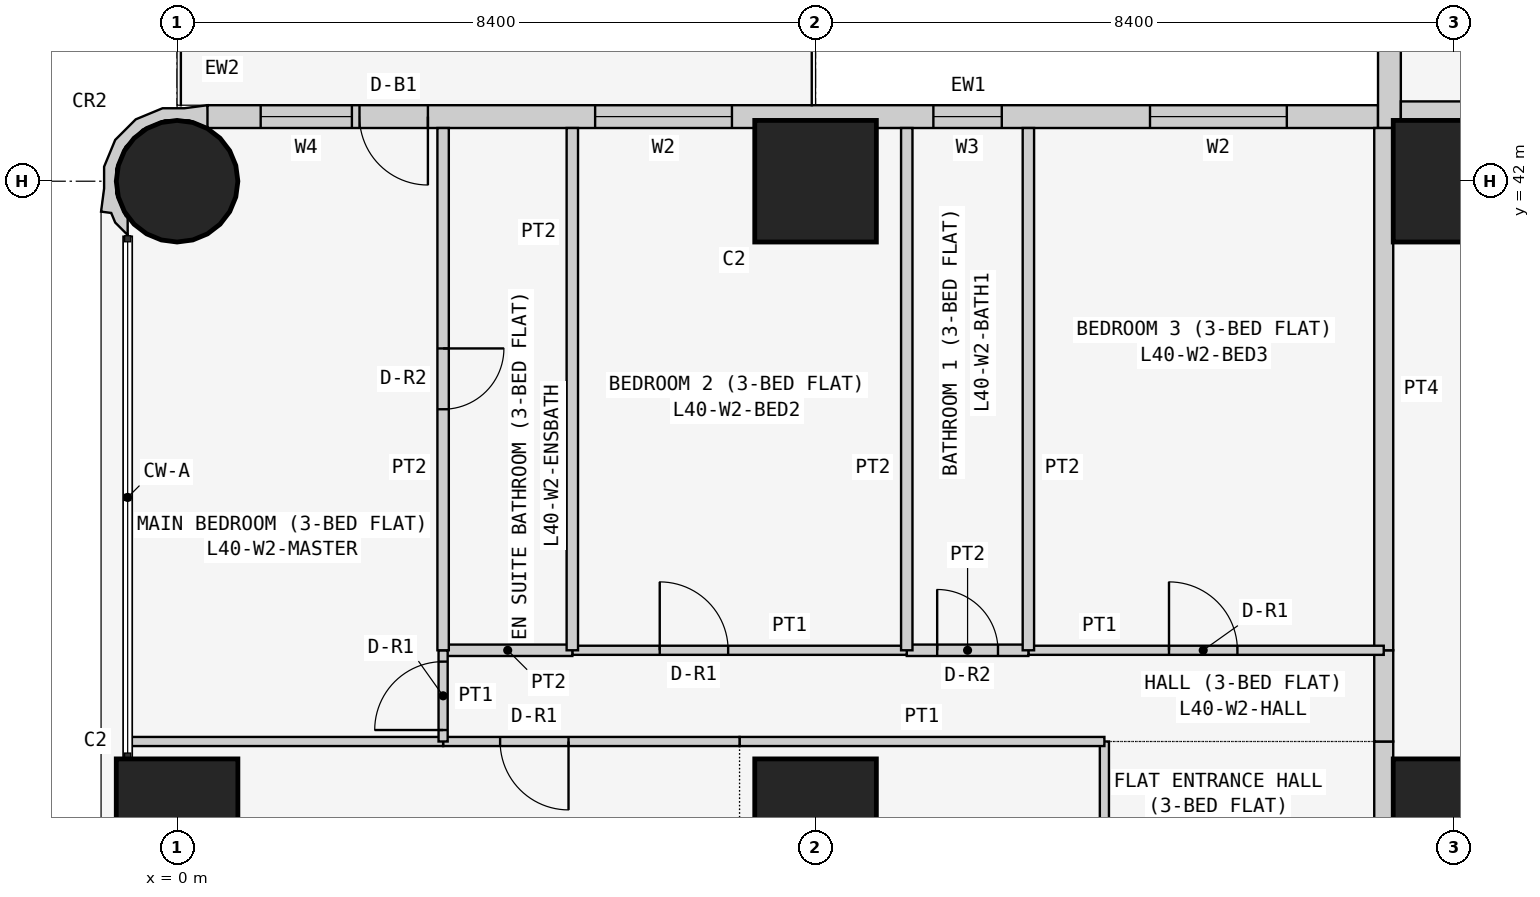
"""IFC4 building model, lengths in metres.
Left out: names, types, materials, properties, quantities, classifications, styles, units other than length and angle.
Written with IfcOpenShell. Run it as: python <this file> out.ifc"""

import sys

from ifc_helpers import new_model, si_unit, direction, frame, frame_2d, origin, origin_2d, place, context, subcontext, project, spatial, polyline, rectangle, circle, outline, extrude, element, fill, save


model = new_model("IFC4")
c1 = context("Model", 3, precision=1e-05, world=origin(), true_north=direction((0.0, 1.0)))
c2 = subcontext(c1, "Body", "Model", "MODEL_VIEW")
j1 = project(units=[si_unit("LENGTHUNIT", "METRE"), si_unit("PLANEANGLEUNIT", "RADIAN")], contexts=[c1])
p1 = place(None, origin())
s1 = spatial("IfcSite", under=j1, at=p1, CompositionType="ELEMENT")
p2 = place(p1, origin())
s2 = spatial("IfcBuilding", under=s1, at=p2, CompositionType="ELEMENT")
p3 = place(p2, frame((0.0, 0.0, 155.7)))
s3 = spatial("IfcBuildingStorey", under=s2, at=p3, CompositionType="ELEMENT", Elevation=155.7)
p4 = place(p3, frame((0.0, 33.6, 0.0), z_axis=(0.0, 0.0, 1.0), x_axis=(1.0, 0.0, 0.0)))
e1 = element("IfcColumn", 1, at=p4, inside=s3, PredefinedType="COLUMN", context=c2, shape_type="SweptSolid", body=[
    extrude(rectangle(XDim=1.6, YDim=1.6, at=origin_2d()), origin(), (0.0, 0.0, 1.0), 3.6),
])
p5 = place(p3, frame((0.0, 42.0, 0.0), z_axis=(0.0, 0.0, 1.0), x_axis=(1.0, 0.0, 0.0)))
e2 = element("IfcColumn", 2, at=p5, inside=s3, PredefinedType="COLUMN", context=c2, shape_type="SweptSolid", body=[
    extrude(circle(Radius=0.8, at=origin_2d()), origin(), (0.0, 0.0, 1.0), 3.6),
])
for number, where, z_axis, x_axis in (
    (3, (8.4, 33.6, 0.0), (0.0, 0.0, 1.0), (1.0, 0.0, 0.0)),
    (4, (8.4, 42.0, 0.0), (0.0, 0.0, 1.0), (1.0, 0.0, 0.0)),
    (5, (16.8, 33.6, 0.0), (0.0, 0.0, 1.0), (1.0, 0.0, 0.0)),
    (6, (16.8, 42.0, 0.0), (0.0, 0.0, 1.0), (1.0, 0.0, 0.0)),
):
    element("IfcColumn", number, at=place(p3, frame(where, z_axis=z_axis, x_axis=x_axis)), inside=s3, PredefinedType="COLUMN", context=c2, shape_type="SweptSolid", body=[
        extrude(rectangle(XDim=1.6, YDim=1.6, at=origin_2d()), origin(), (0.0, 0.0, 1.0), 3.6),
    ])
p6 = place(p3, frame((15.8, 42.85, 0.0), z_axis=(0.0, 0.0, 1.0), x_axis=(-1.0, 0.0, 0.0)))
e7 = element("IfcWall", 7, at=p6, inside=s3, PredefinedType="SOLIDWALL", context=c2, shape_type="SweptSolid", body=[
    extrude(rectangle(XDim=15.4, YDim=0.3, at=frame_2d((7.7, 0.0))), origin(), (0.0, 0.0, 1.0), 3.45),
])
p7 = place(p6, frame((1.2, 0.0, 0.9)))
e8 = element("IfcOpeningElement", 8, at=p7, cuts=e7, PredefinedType="OPENING", context=c2, shape_type="SweptSolid", body=[
    extrude(rectangle(XDim=1.8, YDim=1.5, at=frame_2d((0.9, 0.75))), frame((0.0, 0.16, 0.0), z_axis=(0.0, -1.0, 0.0), x_axis=(1.0, 0.0, 0.0)), (0.0, 0.0, 1.0), 0.32),
])
p8 = place(p6, frame((4.95, 0.0, 1.5)))
e9 = element("IfcOpeningElement", 9, at=p8, cuts=e7, PredefinedType="OPENING", context=c2, shape_type="SweptSolid", body=[
    extrude(rectangle(XDim=0.9, YDim=0.7, at=frame_2d((0.45, 0.35))), frame((0.0, 0.16, 0.0), z_axis=(0.0, -1.0, 0.0), x_axis=(1.0, 0.0, 0.0)), (0.0, 0.0, 1.0), 0.32),
])
p9 = place(p6, frame((8.5, 0.0, 0.9)))
e10 = element("IfcOpeningElement", 10, at=p9, cuts=e7, PredefinedType="OPENING", context=c2, shape_type="SweptSolid", body=[
    extrude(rectangle(XDim=1.8, YDim=1.5, at=frame_2d((0.9, 0.75))), frame((0.0, 0.16, 0.0), z_axis=(0.0, -1.0, 0.0), x_axis=(1.0, 0.0, 0.0)), (0.0, 0.0, 1.0), 0.32),
])
p10 = place(p6, frame((12.5, 0.0, 0.0)))
e11 = element("IfcOpeningElement", 11, at=p10, cuts=e7, PredefinedType="OPENING", context=c2, shape_type="SweptSolid", body=[
    extrude(rectangle(XDim=0.9, YDim=2.4, at=frame_2d((0.45, 1.2))), frame((0.0, 0.16, 0.0), z_axis=(0.0, -1.0, 0.0), x_axis=(1.0, 0.0, 0.0)), (0.0, 0.0, 1.0), 0.32),
])
p11 = place(p6, frame((13.5, 0.0, 0.9)))
e12 = element("IfcOpeningElement", 12, at=p11, cuts=e7, PredefinedType="OPENING", context=c2, shape_type="SweptSolid", body=[
    extrude(rectangle(XDim=1.2, YDim=1.5, at=frame_2d((0.6, 0.75))), frame((0.0, 0.16, 0.0), z_axis=(0.0, -1.0, 0.0), x_axis=(1.0, 0.0, 0.0)), (0.0, 0.0, 1.0), 0.32),
])
p12 = place(p3, frame((15.95, 50.0, 0.0), z_axis=(0.0, 0.0, 1.0), x_axis=(0.0, -1.0, 0.0)))
e13 = element("IfcWall", 13, at=p12, inside=s3, PredefinedType="SOLIDWALL", context=c2, shape_type="SweptSolid", body=[
    extrude(rectangle(XDim=7.3, YDim=0.3, at=frame_2d((3.65, 0.0))), origin(), (0.0, 0.0, 1.0), 3.45),
])
p13 = place(p12, frame((3.1, 0.0, 0.9)))
e14 = element("IfcOpeningElement", 14, at=p13, cuts=e13, PredefinedType="OPENING", context=c2, shape_type="SweptSolid", body=[
    extrude(rectangle(XDim=2.4, YDim=1.5, at=frame_2d((1.2, 0.75))), frame((0.0, 0.16, 0.0), z_axis=(0.0, -1.0, 0.0), x_axis=(1.0, 0.0, 0.0)), (0.0, 0.0, 1.0), 0.32),
])
p14 = place(p12, frame((0.75, 0.0, 0.9)))
e15 = element("IfcOpeningElement", 15, at=p14, cuts=e13, PredefinedType="OPENING", context=c2, shape_type="SweptSolid", body=[
    extrude(rectangle(XDim=1.2, YDim=1.5, at=frame_2d((0.6, 0.75))), frame((0.0, 0.16, 0.0), z_axis=(0.0, -1.0, 0.0), x_axis=(1.0, 0.0, 0.0)), (0.0, 0.0, 1.0), 0.32),
])
p15 = place(p3, frame((0.327, 42.817, 0.0), z_axis=(0.0, 0.0, 1.0), x_axis=(-0.93923434088, 0.343276641956, 0.0)))
e16 = element("IfcWall", 16, at=p15, inside=s3, PredefinedType="SOLIDWALL", context=c2, shape_type="SweptSolid", body=[
    extrude(outline(polyline([(-0.006, -0.197), (0.266, -0.055), (0.535, 0.044), (0.816, 0.302), (0.977, 0.648), (0.994, 1.03), (0.895, 1.299), (0.828, 1.598), (0.697, 1.569), (0.604, 1.67), (0.394, 1.767), (0.471, 1.556), (0.509, 1.539), (0.724, 1.304), (0.833, 1.005), (0.82, 0.687), (0.686, 0.397), (0.451, 0.182), (0.152, 0.073), (-0.116, 0.084), (-0.127, 0.078), (-0.146, 0.071), (-0.006, -0.197)])), origin(), (0.0, 0.0, 1.0), 3.45),
])
p16 = place(p3, frame((16.1, 42.925, 0.0), z_axis=(0.0, 0.0, 1.0), x_axis=(1.0, 0.0, 0.0)))
e17 = element("IfcWall", 17, at=p16, inside=s3, PredefinedType="PARTITIONING", context=c2, shape_type="SweptSolid", body=[
    extrude(rectangle(XDim=6.871, YDim=0.25, at=frame_2d((3.436, 0.0))), origin(), (0.0, 0.0, 1.0), 3.45),
])
p17 = place(p3, frame((15.875, 29.4, 0.0), z_axis=(0.0, 0.0, 1.0), x_axis=(0.0, 1.0, 0.0)))
e18 = element("IfcWall", 18, at=p17, inside=s3, PredefinedType="PARTITIONING", context=c2, shape_type="SweptSolid", body=[
    extrude(rectangle(XDim=5.229, YDim=0.25, at=frame_2d((2.615, 0.0))), origin(), (0.0, 0.0, 1.0), 3.45),
])
p18 = place(p17, frame((2.1, 0.0, 0.0)))
e19 = element("IfcOpeningElement", 19, at=p18, cuts=e18, PredefinedType="OPENING", context=c2, shape_type="SweptSolid", body=[
    extrude(rectangle(XDim=1.0, YDim=2.1, at=frame_2d((0.5, 1.05))), frame((0.0, 0.135, 0.0), z_axis=(0.0, -1.0, 0.0), x_axis=(1.0, 0.0, 0.0)), (0.0, 0.0, 1.0), 0.27),
])
p19 = place(p3, frame((15.875, 34.629, 0.0), z_axis=(0.0, 0.0, 1.0), x_axis=(0.0, 1.0, 0.0)))
e20 = element("IfcWall", 20, at=p19, inside=s3, PredefinedType="PARTITIONING", context=c2, shape_type="SweptSolid", body=[
    extrude(rectangle(XDim=1.2, YDim=0.25, at=frame_2d((0.6, 0.0))), origin(), (0.0, 0.0, 1.0), 3.45),
])
p20 = place(p3, frame((15.875, 35.829, 0.0), z_axis=(0.0, 0.0, 1.0), x_axis=(0.0, 1.0, 0.0)))
e21 = element("IfcWall", 21, at=p20, inside=s3, PredefinedType="PARTITIONING", context=c2, shape_type="SweptSolid", body=[
    extrude(rectangle(XDim=6.871, YDim=0.25, at=frame_2d((3.436, 0.0))), origin(), (0.0, 0.0, 1.0), 3.45),
])
p21 = place(p3, frame((12.2, 29.4, 0.0), z_axis=(0.0, 0.0, 1.0), x_axis=(0.0, 1.0, 0.0)))
e22 = element("IfcWall", 22, at=p21, inside=s3, PredefinedType="PARTITIONING", context=c2, shape_type="SweptSolid", body=[
    extrude(rectangle(XDim=5.229, YDim=0.12, at=frame_2d((2.615, 0.0))), origin(), (0.0, 0.0, 1.0), 3.45),
])
p22 = place(p21, frame((1.05, 0.0, 0.0)))
e23 = element("IfcOpeningElement", 23, at=p22, cuts=e22, PredefinedType="OPENING", context=c2, shape_type="SweptSolid", body=[
    extrude(rectangle(XDim=0.9, YDim=2.1, at=frame_2d((0.45, 1.05))), frame((0.0, 0.07, 0.0), z_axis=(0.0, -1.0, 0.0), x_axis=(1.0, 0.0, 0.0)), (0.0, 0.0, 1.0), 0.14),
])
p23 = place(p3, frame((7.4, 34.629, 0.0), z_axis=(0.0, 0.0, 1.0), x_axis=(1.0, 0.0, 0.0)))
e24 = element("IfcWall", 24, at=p23, inside=s3, PredefinedType="PARTITIONING", context=c2, shape_type="SweptSolid", body=[
    extrude(rectangle(XDim=4.8, YDim=0.12, at=frame_2d((2.4, 0.0))), origin(), (0.0, 0.0, 1.0), 3.45),
])
p24 = place(p3, frame((3.5, 34.629, 0.0), z_axis=(0.0, 0.0, 1.0), x_axis=(1.0, 0.0, 0.0)))
e25 = element("IfcWall", 25, at=p24, inside=s3, PredefinedType="PARTITIONING", context=c2, shape_type="SweptSolid", body=[
    extrude(rectangle(XDim=3.9, YDim=0.12, at=frame_2d((1.95, 0.0))), origin(), (0.0, 0.0, 1.0), 3.45),
])
p25 = place(p24, frame((0.75, 0.0, 0.0)))
e26 = element("IfcOpeningElement", 26, at=p25, cuts=e25, PredefinedType="OPENING", context=c2, shape_type="SweptSolid", body=[
    extrude(rectangle(XDim=0.9, YDim=2.1, at=frame_2d((0.45, 1.05))), frame((0.0, 0.07, 0.0), z_axis=(0.0, -1.0, 0.0), x_axis=(1.0, 0.0, 0.0)), (0.0, 0.0, 1.0), 0.14),
])
p26 = place(p3, frame((-0.65, 34.629, 0.0), z_axis=(0.0, 0.0, 1.0), x_axis=(1.0, 0.0, 0.0)))
e27 = element("IfcWall", 27, at=p26, inside=s3, PredefinedType="PARTITIONING", context=c2, shape_type="SweptSolid", body=[
    extrude(rectangle(XDim=4.15, YDim=0.12, at=frame_2d((2.075, 0.0))), origin(), (0.0, 0.0, 1.0), 3.45),
])
p27 = place(p3, frame((11.2, 35.829, 0.0), z_axis=(0.0, 0.0, 1.0), x_axis=(1.0, 0.0, 0.0)))
e28 = element("IfcWall", 28, at=p27, inside=s3, PredefinedType="PARTITIONING", context=c2, shape_type="SweptSolid", body=[
    extrude(rectangle(XDim=4.675, YDim=0.12, at=frame_2d((2.337, 0.0))), origin(), (0.0, 0.0, 1.0), 3.45),
])
p28 = place(p27, frame((1.85, 0.0, 0.0)))
e29 = element("IfcOpeningElement", 29, at=p28, cuts=e28, PredefinedType="OPENING", context=c2, shape_type="SweptSolid", body=[
    extrude(rectangle(XDim=0.9, YDim=2.1, at=frame_2d((0.45, 1.05))), frame((0.0, 0.07, 0.0), z_axis=(0.0, -1.0, 0.0), x_axis=(1.0, 0.0, 0.0)), (0.0, 0.0, 1.0), 0.14),
])
p29 = place(p3, frame((9.6, 35.829, 0.0), z_axis=(0.0, 0.0, 1.0), x_axis=(1.0, 0.0, 0.0)))
e30 = element("IfcWall", 30, at=p29, inside=s3, PredefinedType="PARTITIONING", context=c2, shape_type="SweptSolid", body=[
    extrude(rectangle(XDim=1.6, YDim=0.15, at=frame_2d((0.8, 0.0))), origin(), (0.0, 0.0, 1.0), 3.45),
])
p30 = place(p29, frame((0.4, 0.0, 0.0)))
e31 = element("IfcOpeningElement", 31, at=p30, cuts=e30, PredefinedType="OPENING", context=c2, shape_type="SweptSolid", body=[
    extrude(rectangle(XDim=0.8, YDim=2.1, at=frame_2d((0.4, 1.05))), frame((0.0, 0.085, 0.0), z_axis=(0.0, -1.0, 0.0), x_axis=(1.0, 0.0, 0.0)), (0.0, 0.0, 1.0), 0.17),
])
p31 = place(p3, frame((5.2, 35.829, 0.0), z_axis=(0.0, 0.0, 1.0), x_axis=(1.0, 0.0, 0.0)))
e32 = element("IfcWall", 32, at=p31, inside=s3, PredefinedType="PARTITIONING", context=c2, shape_type="SweptSolid", body=[
    extrude(rectangle(XDim=4.4, YDim=0.12, at=frame_2d((2.2, 0.0))), origin(), (0.0, 0.0, 1.0), 3.45),
])
p32 = place(p31, frame((1.15, 0.0, 0.0)))
e33 = element("IfcOpeningElement", 33, at=p32, cuts=e32, PredefinedType="OPENING", context=c2, shape_type="SweptSolid", body=[
    extrude(rectangle(XDim=0.9, YDim=2.1, at=frame_2d((0.45, 1.05))), frame((0.0, 0.07, 0.0), z_axis=(0.0, -1.0, 0.0), x_axis=(1.0, 0.0, 0.0)), (0.0, 0.0, 1.0), 0.14),
])
p33 = place(p3, frame((3.5, 35.829, 0.0), z_axis=(0.0, 0.0, 1.0), x_axis=(1.0, 0.0, 0.0)))
e34 = element("IfcWall", 34, at=p33, inside=s3, PredefinedType="PARTITIONING", context=c2, shape_type="SweptSolid", body=[
    extrude(rectangle(XDim=1.7, YDim=0.15, at=frame_2d((0.85, 0.0))), origin(), (0.0, 0.0, 1.0), 3.45),
])
p34 = place(p3, frame((3.5, 34.629, 0.0), z_axis=(0.0, 0.0, 1.0), x_axis=(0.0, 1.0, 0.0)))
e35 = element("IfcWall", 35, at=p34, inside=s3, PredefinedType="PARTITIONING", context=c2, shape_type="SweptSolid", body=[
    extrude(rectangle(XDim=1.2, YDim=0.12, at=frame_2d((0.6, 0.0))), origin(), (0.0, 0.0, 1.0), 3.45),
])
p35 = place(p34, frame((0.151, 0.0, 0.0)))
e36 = element("IfcOpeningElement", 36, at=p35, cuts=e35, PredefinedType="OPENING", context=c2, shape_type="SweptSolid", body=[
    extrude(rectangle(XDim=0.9, YDim=2.1, at=frame_2d((0.45, 1.05))), frame((0.0, 0.07, 0.0), z_axis=(0.0, -1.0, 0.0), x_axis=(1.0, 0.0, 0.0)), (0.0, 0.0, 1.0), 0.14),
])
for number, where, z_axis, x_axis in (
    (37, (11.2, 35.829, 0.0), (0.0, 0.0, 1.0), (0.0, 1.0, 0.0)),
    (38, (9.6, 35.829, 0.0), (0.0, 0.0, 1.0), (0.0, 1.0, 0.0)),
    (39, (5.2, 35.829, 0.0), (0.0, 0.0, 1.0), (0.0, 1.0, 0.0)),
):
    element("IfcWall", number, at=place(p3, frame(where, z_axis=z_axis, x_axis=x_axis)), inside=s3, PredefinedType="PARTITIONING", context=c2, shape_type="SweptSolid", body=[
        extrude(rectangle(XDim=6.871, YDim=0.15, at=frame_2d((3.436, 0.0))), origin(), (0.0, 0.0, 1.0), 3.45),
    ])
p36 = place(p3, frame((3.5, 35.829, 0.0), z_axis=(0.0, 0.0, 1.0), x_axis=(0.0, 1.0, 0.0)))
e40 = element("IfcWall", 40, at=p36, inside=s3, PredefinedType="PARTITIONING", context=c2, shape_type="SweptSolid", body=[
    extrude(rectangle(XDim=6.871, YDim=0.15, at=frame_2d((3.436, 0.0))), origin(), (0.0, 0.0, 1.0), 3.45),
])
p37 = place(p36, frame((3.171, 0.0, 0.0)))
e41 = element("IfcOpeningElement", 41, at=p37, cuts=e40, PredefinedType="OPENING", context=c2, shape_type="SweptSolid", body=[
    extrude(rectangle(XDim=0.8, YDim=2.1, at=frame_2d((0.4, 1.05))), frame((0.0, 0.085, 0.0), z_axis=(0.0, -1.0, 0.0), x_axis=(1.0, 0.0, 0.0)), (0.0, 0.0, 1.0), 0.17),
])
p38 = place(p7, origin())
e42 = element("IfcWindow", 42, at=p38, inside=s3, PartitioningType="SINGLE_PANEL", PredefinedType="WINDOW", context=c2, shape_type="SweptSolid", body=[
    extrude(rectangle(XDim=1.8, YDim=1.5, at=frame_2d((0.9, 0.75))), frame((0.0, 0.03, 0.0), z_axis=(0.0, -1.0, 0.0), x_axis=(1.0, 0.0, 0.0)), (0.0, 0.0, 1.0), 0.06),
])
fill(e8, e42)
p39 = place(p8, origin())
e43 = element("IfcWindow", 43, at=p39, inside=s3, PartitioningType="SINGLE_PANEL", PredefinedType="WINDOW", context=c2, shape_type="SweptSolid", body=[
    extrude(rectangle(XDim=0.9, YDim=0.7, at=frame_2d((0.45, 0.35))), frame((0.0, 0.03, 0.0), z_axis=(0.0, -1.0, 0.0), x_axis=(1.0, 0.0, 0.0)), (0.0, 0.0, 1.0), 0.06),
])
fill(e9, e43)
p40 = place(p9, origin())
e44 = element("IfcWindow", 44, at=p40, inside=s3, PartitioningType="SINGLE_PANEL", PredefinedType="WINDOW", context=c2, shape_type="SweptSolid", body=[
    extrude(rectangle(XDim=1.8, YDim=1.5, at=frame_2d((0.9, 0.75))), frame((0.0, 0.03, 0.0), z_axis=(0.0, -1.0, 0.0), x_axis=(1.0, 0.0, 0.0)), (0.0, 0.0, 1.0), 0.06),
])
fill(e10, e44)
p41 = place(p10, origin())
e45 = element("IfcDoor", 45, at=p41, inside=s3, OperationType="SINGLE_SWING_LEFT", PredefinedType="DOOR", context=c2, shape_type="SweptSolid", body=[
    extrude(rectangle(XDim=0.9, YDim=2.4, at=frame_2d((0.45, 1.2))), frame((0.0, 0.025, 0.0), z_axis=(0.0, -1.0, 0.0), x_axis=(1.0, 0.0, 0.0)), (0.0, 0.0, 1.0), 0.05),
])
fill(e11, e45)
p42 = place(p11, origin())
e46 = element("IfcWindow", 46, at=p42, inside=s3, PartitioningType="SINGLE_PANEL", PredefinedType="WINDOW", context=c2, shape_type="SweptSolid", body=[
    extrude(rectangle(XDim=1.2, YDim=1.5, at=frame_2d((0.6, 0.75))), frame((0.0, 0.03, 0.0), z_axis=(0.0, -1.0, 0.0), x_axis=(1.0, 0.0, 0.0)), (0.0, 0.0, 1.0), 0.06),
])
fill(e12, e46)
p43 = place(p25, frame((0.9, 0.0, 0.0), z_axis=(0.0, 0.0, 1.0), x_axis=(-1.0, 0.0, 0.0)))
e47 = element("IfcDoor", 47, at=p43, inside=s3, OperationType="SINGLE_SWING_LEFT", PredefinedType="DOOR", context=c2, shape_type="SweptSolid", body=[
    extrude(rectangle(XDim=0.9, YDim=2.1, at=frame_2d((0.45, 1.05))), frame((0.0, 0.025, 0.0), z_axis=(0.0, -1.0, 0.0), x_axis=(1.0, 0.0, 0.0)), (0.0, 0.0, 1.0), 0.05),
])
fill(e26, e47)
p44 = place(p28, origin())
e48 = element("IfcDoor", 48, at=p44, inside=s3, OperationType="SINGLE_SWING_LEFT", PredefinedType="DOOR", context=c2, shape_type="SweptSolid", body=[
    extrude(rectangle(XDim=0.9, YDim=2.1, at=frame_2d((0.45, 1.05))), frame((0.0, 0.025, 0.0), z_axis=(0.0, -1.0, 0.0), x_axis=(1.0, 0.0, 0.0)), (0.0, 0.0, 1.0), 0.05),
])
fill(e29, e48)
p45 = place(p30, origin())
e49 = element("IfcDoor", 49, at=p45, inside=s3, OperationType="SINGLE_SWING_LEFT", PredefinedType="DOOR", context=c2, shape_type="SweptSolid", body=[
    extrude(rectangle(XDim=0.8, YDim=2.1, at=frame_2d((0.4, 1.05))), frame((0.0, 0.025, 0.0), z_axis=(0.0, -1.0, 0.0), x_axis=(1.0, 0.0, 0.0)), (0.0, 0.0, 1.0), 0.05),
])
fill(e31, e49)
p46 = place(p32, origin())
e50 = element("IfcDoor", 50, at=p46, inside=s3, OperationType="SINGLE_SWING_LEFT", PredefinedType="DOOR", context=c2, shape_type="SweptSolid", body=[
    extrude(rectangle(XDim=0.9, YDim=2.1, at=frame_2d((0.45, 1.05))), frame((0.0, 0.025, 0.0), z_axis=(0.0, -1.0, 0.0), x_axis=(1.0, 0.0, 0.0)), (0.0, 0.0, 1.0), 0.05),
])
fill(e33, e50)
p47 = place(p35, origin())
e51 = element("IfcDoor", 51, at=p47, inside=s3, OperationType="SINGLE_SWING_LEFT", PredefinedType="DOOR", context=c2, shape_type="SweptSolid", body=[
    extrude(rectangle(XDim=0.9, YDim=2.1, at=frame_2d((0.45, 1.05))), frame((0.0, 0.025, 0.0), z_axis=(0.0, -1.0, 0.0), x_axis=(1.0, 0.0, 0.0)), (0.0, 0.0, 1.0), 0.05),
])
fill(e36, e51)
p48 = place(p37, frame((0.8, 0.0, 0.0), z_axis=(0.0, 0.0, 1.0), x_axis=(-1.0, 0.0, 0.0)))
e52 = element("IfcDoor", 52, at=p48, inside=s3, OperationType="SINGLE_SWING_LEFT", PredefinedType="DOOR", context=c2, shape_type="SweptSolid", body=[
    extrude(rectangle(XDim=0.8, YDim=2.1, at=frame_2d((0.4, 1.05))), frame((0.0, 0.025, 0.0), z_axis=(0.0, -1.0, 0.0), x_axis=(1.0, 0.0, 0.0)), (0.0, 0.0, 1.0), 0.05),
])
fill(e41, e52)
save(model, sys.argv[1])
